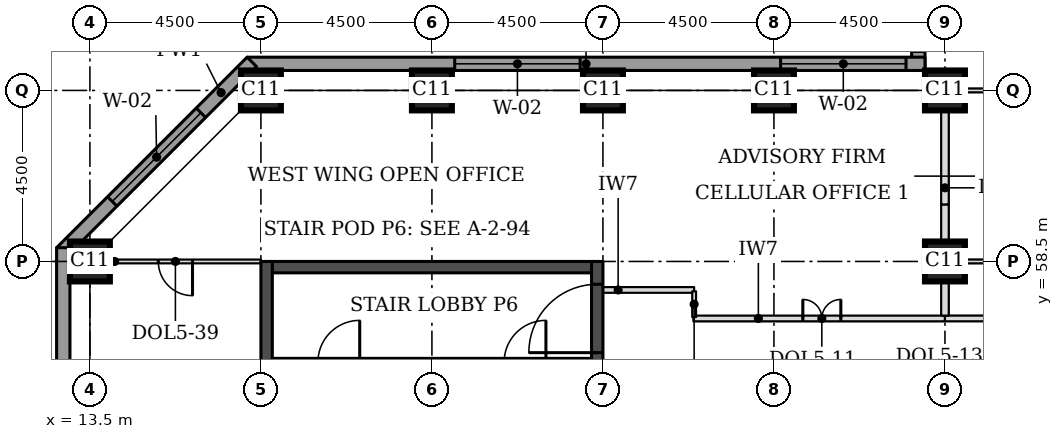
"""IFC4 building model, lengths in metres.
Left out: names, types, materials, properties, quantities, classifications, styles, units other than length and angle.
Written with IfcOpenShell. Run it as: python <this file> out.ifc"""

import sys

from ifc_helpers import new_model, si_unit, direction, frame, frame_2d, origin, origin_2d, place, context, subcontext, project, spatial, rectangle, extrude, element, fill, save


model = new_model("IFC4")
c1 = context("Model", 3, precision=1e-05, world=origin(), true_north=direction((0.0, 1.0)))
c2 = subcontext(c1, "Body", "Model", "MODEL_VIEW")
j1 = project(units=[si_unit("LENGTHUNIT", "METRE"), si_unit("PLANEANGLEUNIT", "RADIAN")], contexts=[c1])
p1 = place(None, origin())
s1 = spatial("IfcSite", under=j1, at=p1, CompositionType="ELEMENT")
p2 = place(p1, origin())
s2 = spatial("IfcBuilding", under=s1, at=p2, CompositionType="ELEMENT")
p3 = place(p2, frame((0.0, 0.0, 108.5)))
s3 = spatial("IfcBuildingStorey", under=s2, at=p3, CompositionType="ELEMENT", Elevation=108.5)
for number, where, z_axis, x_axis in (
    (1, (13.5, 58.5, 0.0), (0.0, 0.0, 1.0), (1.0, 0.0, 0.0)),
    (2, (36.0, 58.5, 0.0), (0.0, 0.0, 1.0), (1.0, 0.0, 0.0)),
    (3, (18.0, 63.0, 0.0), (0.0, 0.0, 1.0), (1.0, 0.0, 0.0)),
    (4, (22.5, 63.0, 0.0), (0.0, 0.0, 1.0), (1.0, 0.0, 0.0)),
    (5, (27.0, 63.0, 0.0), (0.0, 0.0, 1.0), (1.0, 0.0, 0.0)),
    (6, (31.5, 63.0, 0.0), (0.0, 0.0, 1.0), (1.0, 0.0, 0.0)),
    (7, (36.0, 63.0, 0.0), (0.0, 0.0, 1.0), (1.0, 0.0, 0.0)),
):
    element("IfcColumn", number, at=place(p3, frame(where, z_axis=z_axis, x_axis=x_axis)), inside=s3, PredefinedType="COLUMN", context=c2, shape_type="SweptSolid", body=[
        extrude(rectangle(XDim=1.05, YDim=1.05, at=origin_2d()), origin(), (0.0, 0.0, 1.0), 3.7),
    ])
p4 = place(p3, frame((18.3, 58.35, 0.0), z_axis=(0.0, 0.0, 1.0), x_axis=(1.0, 0.0, 0.0)))
e8 = element("IfcWall", 8, at=p4, inside=s3, PredefinedType="SHEAR", context=c2, shape_type="SweptSolid", body=[
    extrude(rectangle(XDim=8.4, YDim=0.3, at=frame_2d((4.2, 0.0))), origin(), (0.0, 0.0, 1.0), 3.7),
])
p5 = place(p3, frame((18.15, 49.5, 0.0), z_axis=(0.0, 0.0, 1.0), x_axis=(0.0, 1.0, 0.0)))
e9 = element("IfcWall", 9, at=p5, inside=s3, PredefinedType="SHEAR", context=c2, shape_type="SweptSolid", body=[
    extrude(rectangle(XDim=9.0, YDim=0.3, at=frame_2d((4.5, 0.0))), origin(), (0.0, 0.0, 1.0), 3.7),
])
p6 = place(p3, frame((26.85, 49.5, 0.0), z_axis=(0.0, 0.0, 1.0), x_axis=(0.0, 1.0, 0.0)))
e10 = element("IfcWall", 10, at=p6, inside=s3, PredefinedType="SHEAR", context=c2, shape_type="SweptSolid", body=[
    extrude(rectangle(XDim=9.0, YDim=0.3, at=frame_2d((4.5, 0.0))), origin(), (0.0, 0.0, 1.0), 3.7),
])
p7 = place(p6, frame((6.6, 0.0, 0.0)))
e11 = element("IfcOpeningElement", 11, at=p7, cuts=e10, PredefinedType="OPENING", context=c2, shape_type="SweptSolid", body=[
    extrude(rectangle(XDim=1.8, YDim=2.1, at=frame_2d((0.9, 1.05))), frame((0.0, 0.16, 0.0), z_axis=(0.0, -1.0, 0.0), x_axis=(1.0, 0.0, 0.0)), (0.0, 0.0, 1.0), 0.32),
])
p8 = place(p3, frame((35.3, 76.862, 0.0), z_axis=(0.0, 0.0, 1.0), x_axis=(0.0, -1.0, 0.0)))
e12 = element("IfcWall", 12, at=p8, inside=s3, PredefinedType="STANDARD", context=c2, shape_type="SweptSolid", body=[
    extrude(rectangle(XDim=13.337, YDim=0.35, at=frame_2d((6.669, 0.0))), origin(), (0.0, 0.0, 1.0), 3.525),
])
p9 = place(p8, frame((9.537, 0.0, 0.9)))
e13 = element("IfcOpeningElement", 13, at=p9, cuts=e12, PredefinedType="OPENING", context=c2, shape_type="SweptSolid", body=[
    extrude(rectangle(XDim=3.3, YDim=1.9, at=frame_2d((1.65, 0.95))), frame((0.0, 0.185, 0.0), z_axis=(0.0, -1.0, 0.0), x_axis=(1.0, 0.0, 0.0)), (0.0, 0.0, 1.0), 0.37),
])
p10 = place(p3, frame((35.475, 63.7, 0.0), z_axis=(0.0, 0.0, 1.0), x_axis=(-1.0, 0.0, 0.0)))
e14 = element("IfcWall", 14, at=p10, inside=s3, PredefinedType="STANDARD", context=c2, shape_type="SweptSolid", body=[
    extrude(rectangle(XDim=17.837, YDim=0.35, at=frame_2d((8.919, 0.0))), origin(), (0.0, 0.0, 1.0), 3.525),
])
p11 = place(p10, frame((0.5, 0.0, 0.9)))
e15 = element("IfcOpeningElement", 15, at=p11, cuts=e14, PredefinedType="OPENING", context=c2, shape_type="SweptSolid", body=[
    extrude(rectangle(XDim=3.3, YDim=1.9, at=frame_2d((1.65, 0.95))), frame((0.0, 0.185, 0.0), z_axis=(0.0, -1.0, 0.0), x_axis=(1.0, 0.0, 0.0)), (0.0, 0.0, 1.0), 0.37),
])
p12 = place(p10, frame((9.075, 0.0, 0.9)))
e16 = element("IfcOpeningElement", 16, at=p12, cuts=e14, PredefinedType="OPENING", context=c2, shape_type="SweptSolid", body=[
    extrude(rectangle(XDim=3.3, YDim=1.9, at=frame_2d((1.65, 0.95))), frame((0.0, 0.185, 0.0), z_axis=(0.0, -1.0, 0.0), x_axis=(1.0, 0.0, 0.0)), (0.0, 0.0, 1.0), 0.37),
])
p13 = place(p3, frame((17.761, 63.751, 0.0), z_axis=(0.0, 0.0, 1.0), x_axis=(-0.707106781187, -0.707106781187, 0.0)))
e17 = element("IfcWall", 17, at=p13, inside=s3, PredefinedType="STANDARD", context=c2, shape_type="SweptSolid", body=[
    extrude(rectangle(XDim=7.089, YDim=0.35, at=frame_2d((3.544, 0.0))), origin(), (0.0, 0.0, 1.0), 3.525),
])
p14 = place(p13, frame((1.894, 0.0, 0.9)))
e18 = element("IfcOpeningElement", 18, at=p14, cuts=e17, PredefinedType="OPENING", context=c2, shape_type="SweptSolid", body=[
    extrude(rectangle(XDim=3.3, YDim=1.9, at=frame_2d((1.65, 0.95))), frame((0.0, 0.185, 0.0), z_axis=(0.0, -1.0, 0.0), x_axis=(1.0, 0.0, 0.0)), (0.0, 0.0, 1.0), 0.37),
])
p15 = place(p3, frame((12.8, 58.862, 0.0), z_axis=(0.0, 0.0, 1.0), x_axis=(0.0, -1.0, 0.0)))
e19 = element("IfcWall", 19, at=p15, inside=s3, PredefinedType="STANDARD", context=c2, shape_type="SweptSolid", body=[
    extrude(rectangle(XDim=14.225, YDim=0.35, at=frame_2d((7.112, 0.0))), origin(), (0.0, 0.0, 1.0), 3.525),
])
p16 = place(p15, frame((5.462, 0.0, 0.9)))
e20 = element("IfcOpeningElement", 20, at=p16, cuts=e19, PredefinedType="OPENING", context=c2, shape_type="SweptSolid", body=[
    extrude(rectangle(XDim=3.3, YDim=1.9, at=frame_2d((1.65, 0.95))), frame((0.0, 0.185, 0.0), z_axis=(0.0, -1.0, 0.0), x_axis=(1.0, 0.0, 0.0)), (0.0, 0.0, 1.0), 0.37),
])
p17 = place(p3, frame((29.38, 57.0, 0.0), z_axis=(0.0, 0.0, 1.0), x_axis=(1.0, 0.0, 0.0)))
e21 = element("IfcWall", 21, at=p17, inside=s3, PredefinedType="PARTITIONING", context=c2, shape_type="SweptSolid", body=[
    extrude(rectangle(XDim=6.62, YDim=0.15, at=frame_2d((3.31, 0.0))), origin(), (0.0, 0.0, 1.0), 3.55),
])
p18 = place(p17, frame((2.88, 0.0, 0.0)))
e22 = element("IfcOpeningElement", 22, at=p18, cuts=e21, PredefinedType="OPENING", context=c2, shape_type="SweptSolid", body=[
    extrude(rectangle(XDim=1.0, YDim=2.1, at=frame_2d((0.5, 1.05))), frame((0.0, 0.085, 0.0), z_axis=(0.0, -1.0, 0.0), x_axis=(1.0, 0.0, 0.0)), (0.0, 0.0, 1.0), 0.17),
])
p19 = place(p3, frame((36.0, 57.0, 0.0), z_axis=(0.0, 0.0, 1.0), x_axis=(1.0, 0.0, 0.0)))
e23 = element("IfcWall", 23, at=p19, inside=s3, PredefinedType="PARTITIONING", context=c2, shape_type="SweptSolid", body=[
    extrude(rectangle(XDim=6.075, YDim=0.15, at=frame_2d((3.038, 0.0))), origin(), (0.0, 0.0, 1.0), 3.55),
])
p20 = place(p19, frame((2.55, 0.0, 0.0)))
e24 = element("IfcOpeningElement", 24, at=p20, cuts=e23, PredefinedType="OPENING", context=c2, shape_type="SweptSolid", body=[
    extrude(rectangle(XDim=1.0, YDim=2.1, at=frame_2d((0.5, 1.05))), frame((0.0, 0.085, 0.0), z_axis=(0.0, -1.0, 0.0), x_axis=(1.0, 0.0, 0.0)), (0.0, 0.0, 1.0), 0.17),
])
p21 = place(p3, frame((36.525, 58.5, 0.0), z_axis=(0.0, 0.0, 1.0), x_axis=(1.0, 0.0, 0.0)))
e25 = element("IfcWall", 25, at=p21, inside=s3, PredefinedType="PARTITIONING", context=c2, shape_type="SweptSolid", body=[
    extrude(rectangle(XDim=2.525, YDim=0.1, at=frame_2d((1.263, 0.0))), origin(), (0.0, 0.0, 1.0), 3.55),
])
p22 = place(p21, frame((0.8, 0.0, 0.0)))
e26 = element("IfcOpeningElement", 26, at=p22, cuts=e25, PredefinedType="OPENING", context=c2, shape_type="SweptSolid", body=[
    extrude(rectangle(XDim=0.9, YDim=2.1, at=frame_2d((0.45, 1.05))), frame((0.0, 0.06, 0.0), z_axis=(0.0, -1.0, 0.0), x_axis=(1.0, 0.0, 0.0)), (0.0, 0.0, 1.0), 0.12),
])
p23 = place(p3, frame((36.525, 63.0, 0.0), z_axis=(0.0, 0.0, 1.0), x_axis=(1.0, 0.0, 0.0)))
e27 = element("IfcWall", 27, at=p23, inside=s3, PredefinedType="PARTITIONING", context=c2, shape_type="SweptSolid", body=[
    extrude(rectangle(XDim=2.425, YDim=0.1, at=frame_2d((1.212, 0.0))), origin(), (0.0, 0.0, 1.0), 3.55),
])
p24 = place(p3, frame((36.0, 57.075, 0.0), z_axis=(0.0, 0.0, 1.0), x_axis=(0.0, 1.0, 0.0)))
e28 = element("IfcWall", 28, at=p24, inside=s3, PredefinedType="PARTITIONING", context=c2, shape_type="SweptSolid", body=[
    extrude(rectangle(XDim=0.9, YDim=0.2, at=frame_2d((0.45, 0.0))), origin(), (0.0, 0.0, 1.0), 2.8),
])
p25 = place(p3, frame((36.0, 58.995, 0.0), z_axis=(0.0, 0.0, 1.0), x_axis=(0.0, 1.0, 0.0)))
e29 = element("IfcWall", 29, at=p25, inside=s3, PredefinedType="PARTITIONING", context=c2, shape_type="SweptSolid", body=[
    extrude(rectangle(XDim=1.005, YDim=0.2, at=frame_2d((0.502, 0.0))), origin(), (0.0, 0.0, 1.0), 2.8),
])
p26 = place(p3, frame((36.0, 60.0, 0.0), z_axis=(0.0, 0.0, 1.0), x_axis=(0.0, 1.0, 0.0)))
e30 = element("IfcWall", 30, at=p26, inside=s3, PredefinedType="PARTITIONING", context=c2, shape_type="SweptSolid", body=[
    extrude(rectangle(XDim=2.475, YDim=0.2, at=frame_2d((1.238, 0.0))), origin(), (0.0, 0.0, 1.0), 2.8),
])
p27 = place(p3, frame((13.5, 58.5, 0.0), z_axis=(0.0, 0.0, 1.0), x_axis=(1.0, 0.0, 0.0)))
e31 = element("IfcWall", 31, at=p27, inside=s3, PredefinedType="PARTITIONING", context=c2, shape_type="SweptSolid", body=[
    extrude(rectangle(XDim=4.5, YDim=0.1, at=frame_2d((2.25, 0.0))), origin(), (0.0, 0.0, 1.0), 2.55),
])
p28 = place(p27, frame((1.8, 0.0, 0.0)))
e32 = element("IfcOpeningElement", 32, at=p28, cuts=e31, PredefinedType="OPENING", context=c2, shape_type="SweptSolid", body=[
    extrude(rectangle(XDim=0.9, YDim=2.1, at=frame_2d((0.45, 1.05))), frame((0.0, 0.06, 0.0), z_axis=(0.0, -1.0, 0.0), x_axis=(1.0, 0.0, 0.0)), (0.0, 0.0, 1.0), 0.12),
])
p29 = place(p3, frame((27.0, 57.75, 0.0), z_axis=(0.0, 0.0, 1.0), x_axis=(1.0, 0.0, 0.0)))
e33 = element("IfcWall", 33, at=p29, inside=s3, PredefinedType="PARTITIONING", context=c2, shape_type="SweptSolid", body=[
    extrude(rectangle(XDim=2.4, YDim=0.15, at=frame_2d((1.2, 0.0))), origin(), (0.0, 0.0, 1.0), 3.55),
])
p30 = place(p3, frame((29.4, 57.715, 0.0), z_axis=(0.0, 0.0, 1.0), x_axis=(0.0, -1.0, 0.0)))
e34 = element("IfcWall", 34, at=p30, inside=s3, PredefinedType="PARTITIONING", context=c2, shape_type="SweptSolid", body=[
    extrude(rectangle(XDim=0.68, YDim=0.1, at=frame_2d((0.34, 0.0))), origin(), (0.0, 0.0, 1.0), 3.55),
])
p31 = place(p3, frame((21.8, 55.85, 0.0), z_axis=(0.0, 0.0, 1.0), x_axis=(1.0, 0.0, 0.0)))
e35 = element("IfcWall", 35, at=p31, inside=s3, PredefinedType="SOLIDWALL", context=c2, shape_type="SweptSolid", body=[
    extrude(rectangle(XDim=1.4, YDim=0.2, at=frame_2d((0.7, 0.0))), origin(), (0.0, 0.0, 1.0), 3.55),
])
p32 = place(p3, frame((18.3, 55.85, 0.0), z_axis=(0.0, 0.0, 1.0), x_axis=(1.0, 0.0, 0.0)))
e36 = element("IfcWall", 36, at=p32, inside=s3, PredefinedType="SOLIDWALL", context=c2, shape_type="SweptSolid", body=[
    extrude(rectangle(XDim=3.5, YDim=0.2, at=frame_2d((1.75, 0.0))), origin(), (0.0, 0.0, 1.0), 3.55),
])
p33 = place(p32, frame((1.2, 0.0, 0.0)))
e37 = element("IfcOpeningElement", 37, at=p33, cuts=e36, PredefinedType="OPENING", context=c2, shape_type="SweptSolid", body=[
    extrude(rectangle(XDim=1.1, YDim=2.1, at=frame_2d((0.55, 1.05))), frame((0.0, 0.11, 0.0), z_axis=(0.0, -1.0, 0.0), x_axis=(1.0, 0.0, 0.0)), (0.0, 0.0, 1.0), 0.22),
])
p34 = place(p3, frame((23.2, 55.85, 0.0), z_axis=(0.0, 0.0, 1.0), x_axis=(1.0, 0.0, 0.0)))
e38 = element("IfcWall", 38, at=p34, inside=s3, PredefinedType="SOLIDWALL", context=c2, shape_type="SweptSolid", body=[
    extrude(rectangle(XDim=3.5, YDim=0.2, at=frame_2d((1.75, 0.0))), origin(), (0.0, 0.0, 1.0), 3.55),
])
p35 = place(p34, frame((1.2, 0.0, 0.0)))
e39 = element("IfcOpeningElement", 39, at=p35, cuts=e38, PredefinedType="OPENING", context=c2, shape_type="SweptSolid", body=[
    extrude(rectangle(XDim=1.1, YDim=2.1, at=frame_2d((0.55, 1.05))), frame((0.0, 0.11, 0.0), z_axis=(0.0, -1.0, 0.0), x_axis=(1.0, 0.0, 0.0)), (0.0, 0.0, 1.0), 0.22),
])
p36 = place(p11, origin())
e40 = element("IfcWindow", 40, at=p36, inside=s3, PartitioningType="SINGLE_PANEL", PredefinedType="WINDOW", context=c2, shape_type="SweptSolid", body=[
    extrude(rectangle(XDim=3.3, YDim=1.9, at=frame_2d((1.65, 0.95))), frame((0.0, 0.085, 0.0), z_axis=(0.0, -1.0, 0.0), x_axis=(1.0, 0.0, 0.0)), (0.0, 0.0, 1.0), 0.06),
])
fill(e15, e40)
p37 = place(p12, origin())
e41 = element("IfcWindow", 41, at=p37, inside=s3, PartitioningType="SINGLE_PANEL", PredefinedType="WINDOW", context=c2, shape_type="SweptSolid", body=[
    extrude(rectangle(XDim=3.3, YDim=1.9, at=frame_2d((1.65, 0.95))), frame((0.0, 0.085, 0.0), z_axis=(0.0, -1.0, 0.0), x_axis=(1.0, 0.0, 0.0)), (0.0, 0.0, 1.0), 0.06),
])
fill(e16, e41)
p38 = place(p14, origin())
e42 = element("IfcWindow", 42, at=p38, inside=s3, PartitioningType="SINGLE_PANEL", PredefinedType="WINDOW", context=c2, shape_type="SweptSolid", body=[
    extrude(rectangle(XDim=3.3, YDim=1.9, at=frame_2d((1.65, 0.95))), frame((0.0, 0.085, 0.0), z_axis=(0.0, -1.0, 0.0), x_axis=(1.0, 0.0, 0.0)), (0.0, 0.0, 1.0), 0.06),
])
fill(e18, e42)
p39 = place(p18, origin())
e43 = element("IfcDoor", 43, at=p39, inside=s3, OperationType="DOUBLE_DOOR_SINGLE_SWING", PredefinedType="DOOR", context=c2, shape_type="SweptSolid", body=[
    extrude(rectangle(XDim=1.0, YDim=2.1, at=frame_2d((0.5, 1.05))), frame((0.0, 0.025, 0.0), z_axis=(0.0, -1.0, 0.0), x_axis=(1.0, 0.0, 0.0)), (0.0, 0.0, 1.0), 0.05),
])
fill(e22, e43)
p40 = place(p28, frame((0.9, 0.0, 0.0), z_axis=(0.0, 0.0, 1.0), x_axis=(-1.0, 0.0, 0.0)))
e44 = element("IfcDoor", 44, at=p40, inside=s3, OperationType="SINGLE_SWING_LEFT", PredefinedType="DOOR", context=c2, shape_type="SweptSolid", body=[
    extrude(rectangle(XDim=0.9, YDim=2.1, at=frame_2d((0.45, 1.05))), frame((0.0, 0.025, 0.0), z_axis=(0.0, -1.0, 0.0), x_axis=(1.0, 0.0, 0.0)), (0.0, 0.0, 1.0), 0.05),
])
fill(e32, e44)
p41 = place(p7, origin())
e45 = element("IfcDoor", 45, at=p41, inside=s3, OperationType="SINGLE_SWING_LEFT", PredefinedType="DOOR", context=c2, shape_type="SweptSolid", body=[
    extrude(rectangle(XDim=1.8, YDim=2.1, at=frame_2d((0.9, 1.05))), frame((0.0, 0.025, 0.0), z_axis=(0.0, -1.0, 0.0), x_axis=(1.0, 0.0, 0.0)), (0.0, 0.0, 1.0), 0.05),
])
fill(e11, e45)
save(model, sys.argv[1])
